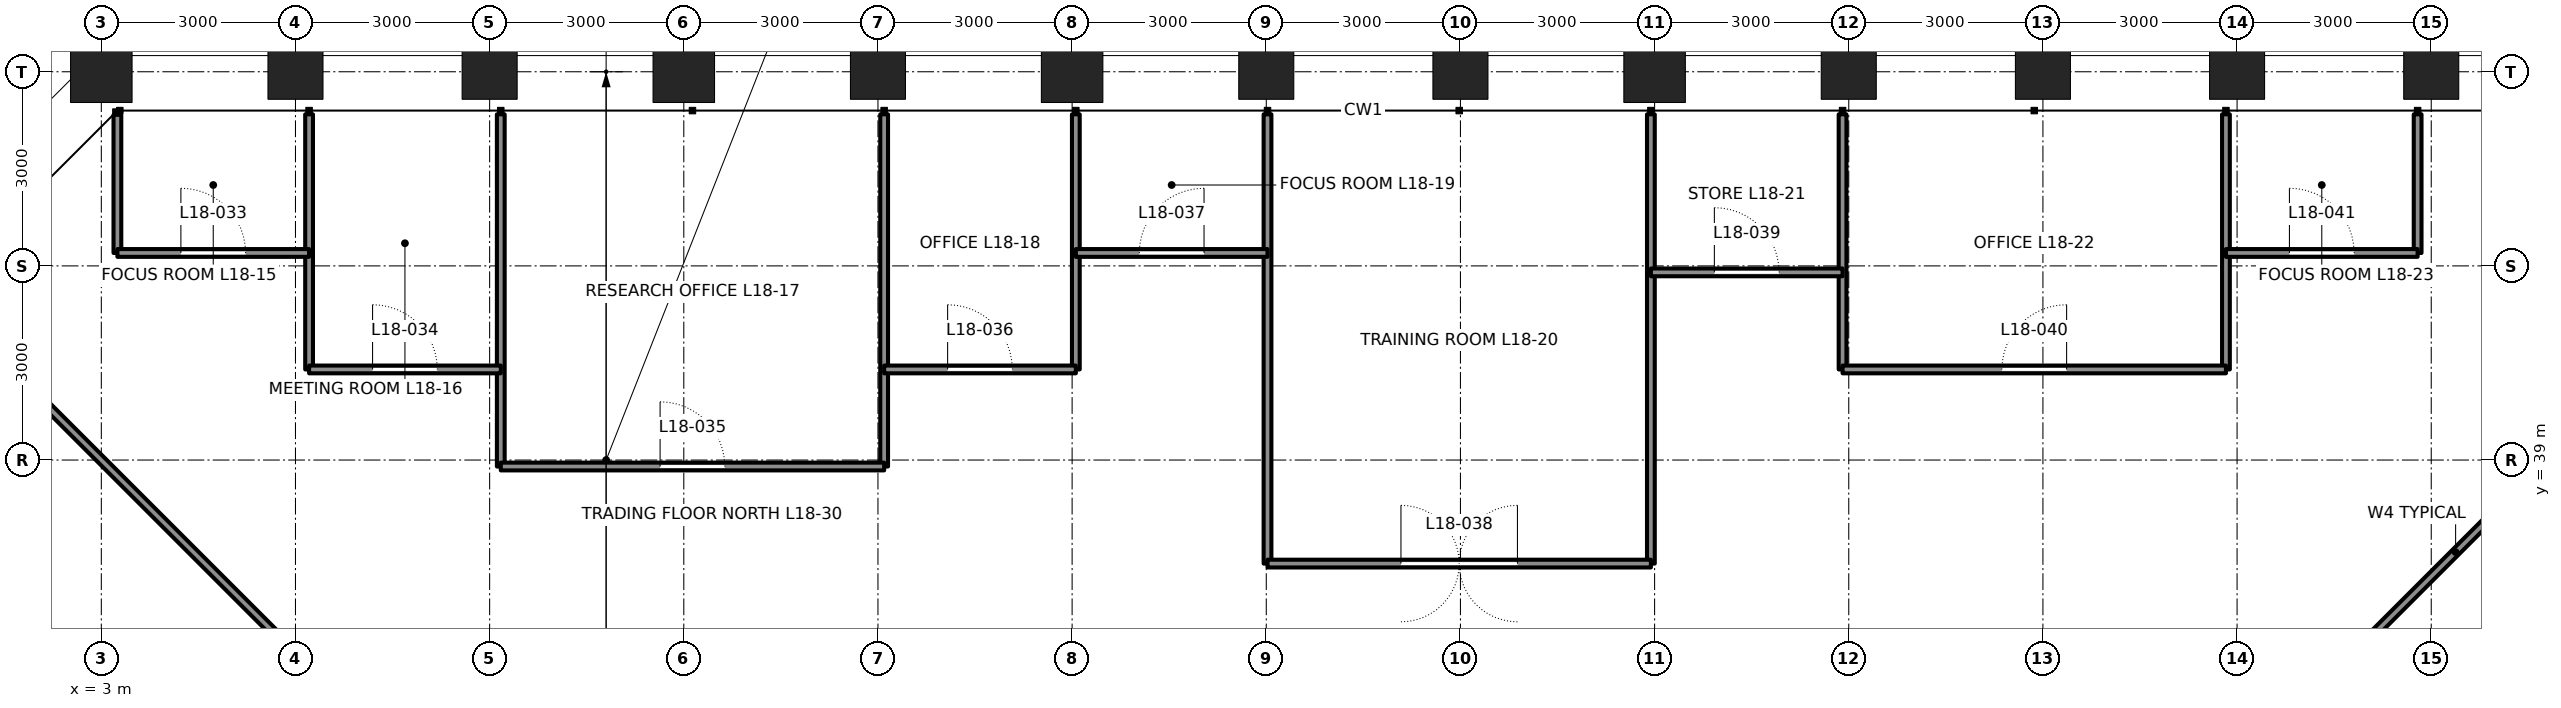
"""IFC4 building model, lengths in metres.
Left out: names, types, materials, properties, quantities, classifications, styles, units other than length and angle.
Written with IfcOpenShell. Run it as: python <this file> out.ifc"""

import sys

from ifc_helpers import new_model, si_unit, direction, frame, frame_2d, origin, origin_2d, place, context, subcontext, project, spatial, rectangle, hollow_rectangle, extrude, element, fill, save


model = new_model("IFC4")
c1 = context("Model", 3, precision=1e-05, world=origin(), true_north=direction((0.0, 1.0)))
c2 = subcontext(c1, "Body", "Model", "MODEL_VIEW")
j1 = project(units=[si_unit("LENGTHUNIT", "METRE"), si_unit("PLANEANGLEUNIT", "RADIAN")], contexts=[c1])
p1 = place(None, origin())
s1 = spatial("IfcSite", under=j1, at=p1, CompositionType="ELEMENT")
p2 = place(p1, origin())
s2 = spatial("IfcBuilding", under=s1, at=p2, CompositionType="ELEMENT")
p3 = place(p2, frame((0.0, 0.0, 87.3)))
s3 = spatial("IfcBuildingStorey", under=s2, at=p3, CompositionType="ELEMENT", Elevation=87.3)
for number, where, z_axis, x_axis in (
    (1, (39.0, 45.0, 0.0), (0.0, 0.0, 1.0), (0.0, 1.0, 0.0)),
    (2, (36.0, 45.0, 0.0), (0.0, 0.0, 1.0), (0.0, 1.0, 0.0)),
    (3, (33.0, 45.0, 0.0), (0.0, 0.0, 1.0), (0.0, 1.0, 0.0)),
    (4, (30.0, 45.0, 0.0), (0.0, 0.0, 1.0), (0.0, 1.0, 0.0)),
):
    element("IfcColumn", number, at=place(p3, frame(where, z_axis=z_axis, x_axis=x_axis)), inside=s3, PredefinedType="COLUMN", context=c2, shape_type="SweptSolid", body=[
        extrude(hollow_rectangle(XDim=0.85, YDim=0.85, WallThickness=0.085, at=origin_2d()), origin(), (0.0, 0.0, 1.0), 4.5),
    ])
p4 = place(p3, frame((27.0, 45.0, 0.0), z_axis=(0.0, 0.0, 1.0), x_axis=(0.0, 1.0, 0.0)))
e5 = element("IfcColumn", 5, at=p4, inside=s3, PredefinedType="COLUMN", context=c2, shape_type="SweptSolid", body=[
    extrude(hollow_rectangle(XDim=0.95, YDim=0.95, WallThickness=0.11, at=origin_2d()), origin(), (0.0, 0.0, 1.0), 4.5),
])
for number, where, z_axis, x_axis in (
    (6, (24.0, 45.0, 0.0), (0.0, 0.0, 1.0), (0.0, 1.0, 0.0)),
    (7, (21.0, 45.0, 0.0), (0.0, 0.0, 1.0), (0.0, 1.0, 0.0)),
):
    element("IfcColumn", number, at=place(p3, frame(where, z_axis=z_axis, x_axis=x_axis)), inside=s3, PredefinedType="COLUMN", context=c2, shape_type="SweptSolid", body=[
        extrude(hollow_rectangle(XDim=0.85, YDim=0.85, WallThickness=0.085, at=origin_2d()), origin(), (0.0, 0.0, 1.0), 4.5),
    ])
p5 = place(p3, frame((18.0, 45.0, 0.0), z_axis=(0.0, 0.0, 1.0), x_axis=(0.0, 1.0, 0.0)))
e8 = element("IfcColumn", 8, at=p5, inside=s3, PredefinedType="COLUMN", context=c2, shape_type="SweptSolid", body=[
    extrude(hollow_rectangle(XDim=0.95, YDim=0.95, WallThickness=0.11, at=origin_2d()), origin(), (0.0, 0.0, 1.0), 4.5),
])
p6 = place(p3, frame((15.0, 45.0, 0.0), z_axis=(0.0, 0.0, 1.0), x_axis=(0.0, 1.0, 0.0)))
e9 = element("IfcColumn", 9, at=p6, inside=s3, PredefinedType="COLUMN", context=c2, shape_type="SweptSolid", body=[
    extrude(hollow_rectangle(XDim=0.85, YDim=0.85, WallThickness=0.085, at=origin_2d()), origin(), (0.0, 0.0, 1.0), 4.5),
])
p7 = place(p3, frame((12.0, 45.0, 0.0), z_axis=(0.0, 0.0, 1.0), x_axis=(0.0, 1.0, 0.0)))
e10 = element("IfcColumn", 10, at=p7, inside=s3, PredefinedType="COLUMN", context=c2, shape_type="SweptSolid", body=[
    extrude(hollow_rectangle(XDim=0.95, YDim=0.95, WallThickness=0.11, at=origin_2d()), origin(), (0.0, 0.0, 1.0), 4.5),
])
for number, where, z_axis, x_axis in (
    (11, (9.0, 45.0, 0.0), (0.0, 0.0, 1.0), (0.0, 1.0, 0.0)),
    (12, (6.0, 45.0, 0.0), (0.0, 0.0, 1.0), (0.0, 1.0, 0.0)),
):
    element("IfcColumn", number, at=place(p3, frame(where, z_axis=z_axis, x_axis=x_axis)), inside=s3, PredefinedType="COLUMN", context=c2, shape_type="SweptSolid", body=[
        extrude(hollow_rectangle(XDim=0.85, YDim=0.85, WallThickness=0.085, at=origin_2d()), origin(), (0.0, 0.0, 1.0), 4.5),
    ])
p8 = place(p3, frame((3.0, 45.0, 0.0), z_axis=(0.0, 0.0, 1.0), x_axis=(0.0, 1.0, 0.0)))
e13 = element("IfcColumn", 13, at=p8, inside=s3, PredefinedType="COLUMN", context=c2, shape_type="SweptSolid", body=[
    extrude(hollow_rectangle(XDim=0.95, YDim=0.95, WallThickness=0.095, at=origin_2d()), origin(), (0.0, 0.0, 1.0), 4.5),
])
p9 = place(p3, frame((3.249, 44.334, -0.3), z_axis=(0.0, 0.0, 1.0), x_axis=(0.0, -1.0, 0.0)))
e14 = element("IfcWall", 14, at=p9, inside=s3, PredefinedType="PARTITIONING", context=c2, shape_type="SweptSolid", body=[
    extrude(rectangle(XDim=2.134, YDim=0.12, at=frame_2d((1.067, 0.0))), origin(), (0.0, 0.0, 1.0), 4.34),
])
p10 = place(p3, frame((6.21, 44.343, -0.3), z_axis=(0.0, 0.0, 1.0), x_axis=(0.0, -1.0, 0.0)))
e15 = element("IfcWall", 15, at=p10, inside=s3, PredefinedType="PARTITIONING", context=c2, shape_type="SweptSolid", body=[
    extrude(rectangle(XDim=3.943, YDim=0.12, at=frame_2d((1.971, 0.0))), origin(), (0.0, 0.0, 1.0), 4.34),
])
p11 = place(p3, frame((9.172, 44.343, -0.3), z_axis=(0.0, 0.0, 1.0), x_axis=(0.0, -1.0, 0.0)))
e16 = element("IfcWall", 16, at=p11, inside=s3, PredefinedType="PARTITIONING", context=c2, shape_type="SweptSolid", body=[
    extrude(rectangle(XDim=5.443, YDim=0.12, at=frame_2d((2.721, 0.0))), origin(), (0.0, 0.0, 1.0), 4.34),
])
p12 = place(p3, frame((15.096, 44.343, -0.3), z_axis=(0.0, 0.0, 1.0), x_axis=(0.0, -1.0, 0.0)))
e17 = element("IfcWall", 17, at=p12, inside=s3, PredefinedType="PARTITIONING", context=c2, shape_type="SweptSolid", body=[
    extrude(rectangle(XDim=5.443, YDim=0.12, at=frame_2d((2.721, 0.0))), origin(), (0.0, 0.0, 1.0), 3.646),
])
p13 = place(p3, frame((18.057, 44.343, -0.3), z_axis=(0.0, 0.0, 1.0), x_axis=(0.0, -1.0, 0.0)))
e18 = element("IfcWall", 18, at=p13, inside=s3, PredefinedType="PARTITIONING", context=c2, shape_type="SweptSolid", body=[
    extrude(rectangle(XDim=3.943, YDim=0.12, at=frame_2d((1.971, 0.0))), origin(), (0.0, 0.0, 1.0), 3.646),
])
for number, where, z_axis, x_axis in (
    (19, (21.019, 44.343, -0.3), (0.0, 0.0, 1.0), (0.0, -1.0, 0.0)),
    (20, (26.943, 44.343, -0.3), (0.0, 0.0, 1.0), (0.0, -1.0, 0.0)),
):
    element("IfcWall", number, at=place(p3, frame(where, z_axis=z_axis, x_axis=x_axis)), inside=s3, PredefinedType="PARTITIONING", context=c2, shape_type="SweptSolid", body=[
        extrude(rectangle(XDim=6.943, YDim=0.12, at=frame_2d((3.471, 0.0))), origin(), (0.0, 0.0, 1.0), 3.646),
    ])
p14 = place(p3, frame((29.904, 44.343, -0.3), z_axis=(0.0, 0.0, 1.0), x_axis=(0.0, -1.0, 0.0)))
e21 = element("IfcWall", 21, at=p14, inside=s3, PredefinedType="PARTITIONING", context=c2, shape_type="SweptSolid", body=[
    extrude(rectangle(XDim=3.943, YDim=0.12, at=frame_2d((1.971, 0.0))), origin(), (0.0, 0.0, 1.0), 3.646),
])
p15 = place(p3, frame((35.828, 44.343, -0.3), z_axis=(0.0, 0.0, 1.0), x_axis=(0.0, -1.0, 0.0)))
e22 = element("IfcWall", 22, at=p15, inside=s3, PredefinedType="PARTITIONING", context=c2, shape_type="SweptSolid", body=[
    extrude(rectangle(XDim=3.943, YDim=0.12, at=frame_2d((1.971, 0.0))), origin(), (0.0, 0.0, 1.0), 4.34),
])
p16 = place(p3, frame((38.79, 44.343, -0.3), z_axis=(0.0, 0.0, 1.0), x_axis=(0.0, -1.0, 0.0)))
e23 = element("IfcWall", 23, at=p16, inside=s3, PredefinedType="PARTITIONING", context=c2, shape_type="SweptSolid", body=[
    extrude(rectangle(XDim=2.143, YDim=0.12, at=frame_2d((1.071, 0.0))), origin(), (0.0, 0.0, 1.0), 4.34),
])
p17 = place(p3, frame((3.249, 42.2, -0.3), z_axis=(0.0, 0.0, 1.0), x_axis=(1.0, 0.0, 0.0)))
e24 = element("IfcWall", 24, at=p17, inside=s3, PredefinedType="PARTITIONING", context=c2, shape_type="SweptSolid", body=[
    extrude(rectangle(XDim=2.962, YDim=0.12, at=frame_2d((1.481, 0.0))), origin(), (0.0, 0.0, 1.0), 4.34),
])
p18 = place(p17, frame((0.981, 0.0, 0.3)))
e25 = element("IfcOpeningElement", 25, at=p18, cuts=e24, PredefinedType="OPENING", context=c2, shape_type="SweptSolid", body=[
    extrude(rectangle(XDim=1.0, YDim=2.4, at=frame_2d((0.5, 1.2))), frame((0.0, 0.07, 0.0), z_axis=(0.0, -1.0, 0.0), x_axis=(1.0, 0.0, 0.0)), (0.0, 0.0, 1.0), 0.14),
])
p19 = place(p3, frame((6.21, 40.4, -0.3), z_axis=(0.0, 0.0, 1.0), x_axis=(1.0, 0.0, 0.0)))
e26 = element("IfcWall", 26, at=p19, inside=s3, PredefinedType="PARTITIONING", context=c2, shape_type="SweptSolid", body=[
    extrude(rectangle(XDim=2.962, YDim=0.12, at=frame_2d((1.481, 0.0))), origin(), (0.0, 0.0, 1.0), 4.34),
])
p20 = place(p19, frame((0.981, 0.0, 0.3)))
e27 = element("IfcOpeningElement", 27, at=p20, cuts=e26, PredefinedType="OPENING", context=c2, shape_type="SweptSolid", body=[
    extrude(rectangle(XDim=1.0, YDim=2.4, at=frame_2d((0.5, 1.2))), frame((0.0, 0.07, 0.0), z_axis=(0.0, -1.0, 0.0), x_axis=(1.0, 0.0, 0.0)), (0.0, 0.0, 1.0), 0.14),
])
p21 = place(p3, frame((9.172, 38.9, -0.3), z_axis=(0.0, 0.0, 1.0), x_axis=(1.0, 0.0, 0.0)))
e28 = element("IfcWall", 28, at=p21, inside=s3, PredefinedType="PARTITIONING", context=c2, shape_type="SweptSolid", body=[
    extrude(rectangle(XDim=5.924, YDim=0.12, at=frame_2d((2.962, 0.0))), origin(), (0.0, 0.0, 1.0), 3.723),
])
p22 = place(p21, frame((2.462, 0.0, 0.3)))
e29 = element("IfcOpeningElement", 29, at=p22, cuts=e28, PredefinedType="OPENING", context=c2, shape_type="SweptSolid", body=[
    extrude(rectangle(XDim=1.0, YDim=2.4, at=frame_2d((0.5, 1.2))), frame((0.0, 0.07, 0.0), z_axis=(0.0, -1.0, 0.0), x_axis=(1.0, 0.0, 0.0)), (0.0, 0.0, 1.0), 0.14),
])
p23 = place(p3, frame((15.096, 40.4, -0.3), z_axis=(0.0, 0.0, 1.0), x_axis=(1.0, 0.0, 0.0)))
e30 = element("IfcWall", 30, at=p23, inside=s3, PredefinedType="PARTITIONING", context=c2, shape_type="SweptSolid", body=[
    extrude(rectangle(XDim=2.962, YDim=0.12, at=frame_2d((1.481, 0.0))), origin(), (0.0, 0.0, 1.0), 4.34),
])
p24 = place(p23, frame((0.981, 0.0, 0.3)))
e31 = element("IfcOpeningElement", 31, at=p24, cuts=e30, PredefinedType="OPENING", context=c2, shape_type="SweptSolid", body=[
    extrude(rectangle(XDim=1.0, YDim=2.4, at=frame_2d((0.5, 1.2))), frame((0.0, 0.07, 0.0), z_axis=(0.0, -1.0, 0.0), x_axis=(1.0, 0.0, 0.0)), (0.0, 0.0, 1.0), 0.14),
])
p25 = place(p3, frame((18.057, 42.2, -0.3), z_axis=(0.0, 0.0, 1.0), x_axis=(1.0, 0.0, 0.0)))
e32 = element("IfcWall", 32, at=p25, inside=s3, PredefinedType="PARTITIONING", context=c2, shape_type="SweptSolid", body=[
    extrude(rectangle(XDim=2.962, YDim=0.12, at=frame_2d((1.481, 0.0))), origin(), (0.0, 0.0, 1.0), 4.34),
])
p26 = place(p25, frame((0.981, 0.0, 0.3)))
e33 = element("IfcOpeningElement", 33, at=p26, cuts=e32, PredefinedType="OPENING", context=c2, shape_type="SweptSolid", body=[
    extrude(rectangle(XDim=1.0, YDim=2.4, at=frame_2d((0.5, 1.2))), frame((0.0, 0.07, 0.0), z_axis=(0.0, -1.0, 0.0), x_axis=(1.0, 0.0, 0.0)), (0.0, 0.0, 1.0), 0.14),
])
p27 = place(p3, frame((21.019, 37.4, -0.3), z_axis=(0.0, 0.0, 1.0), x_axis=(1.0, 0.0, 0.0)))
e34 = element("IfcWall", 34, at=p27, inside=s3, PredefinedType="PARTITIONING", context=c2, shape_type="SweptSolid", body=[
    extrude(rectangle(XDim=5.924, YDim=0.12, at=frame_2d((2.962, 0.0))), origin(), (0.0, 0.0, 1.0), 4.34),
])
p28 = place(p27, frame((2.062, 0.0, 0.3)))
e35 = element("IfcOpeningElement", 35, at=p28, cuts=e34, PredefinedType="OPENING", context=c2, shape_type="SweptSolid", body=[
    extrude(rectangle(XDim=1.8, YDim=2.4, at=frame_2d((0.9, 1.2))), frame((0.0, 0.07, 0.0), z_axis=(0.0, -1.0, 0.0), x_axis=(1.0, 0.0, 0.0)), (0.0, 0.0, 1.0), 0.14),
])
p29 = place(p3, frame((26.943, 41.9, -0.3), z_axis=(0.0, 0.0, 1.0), x_axis=(1.0, 0.0, 0.0)))
e36 = element("IfcWall", 36, at=p29, inside=s3, PredefinedType="PARTITIONING", context=c2, shape_type="SweptSolid", body=[
    extrude(rectangle(XDim=2.962, YDim=0.12, at=frame_2d((1.481, 0.0))), origin(), (0.0, 0.0, 1.0), 4.34),
])
p30 = place(p29, frame((0.981, 0.0, 0.3)))
e37 = element("IfcOpeningElement", 37, at=p30, cuts=e36, PredefinedType="OPENING", context=c2, shape_type="SweptSolid", body=[
    extrude(rectangle(XDim=1.0, YDim=2.4, at=frame_2d((0.5, 1.2))), frame((0.0, 0.07, 0.0), z_axis=(0.0, -1.0, 0.0), x_axis=(1.0, 0.0, 0.0)), (0.0, 0.0, 1.0), 0.14),
])
p31 = place(p3, frame((29.904, 40.4, -0.3), z_axis=(0.0, 0.0, 1.0), x_axis=(1.0, 0.0, 0.0)))
e38 = element("IfcWall", 38, at=p31, inside=s3, PredefinedType="PARTITIONING", context=c2, shape_type="SweptSolid", body=[
    extrude(rectangle(XDim=5.924, YDim=0.12, at=frame_2d((2.962, 0.0))), origin(), (0.0, 0.0, 1.0), 4.34),
])
p32 = place(p31, frame((2.462, 0.0, 0.3)))
e39 = element("IfcOpeningElement", 39, at=p32, cuts=e38, PredefinedType="OPENING", context=c2, shape_type="SweptSolid", body=[
    extrude(rectangle(XDim=1.0, YDim=2.4, at=frame_2d((0.5, 1.2))), frame((0.0, 0.07, 0.0), z_axis=(0.0, -1.0, 0.0), x_axis=(1.0, 0.0, 0.0)), (0.0, 0.0, 1.0), 0.14),
])
p33 = place(p3, frame((35.828, 42.2, -0.3), z_axis=(0.0, 0.0, 1.0), x_axis=(1.0, 0.0, 0.0)))
e40 = element("IfcWall", 40, at=p33, inside=s3, PredefinedType="PARTITIONING", context=c2, shape_type="SweptSolid", body=[
    extrude(rectangle(XDim=2.962, YDim=0.12, at=frame_2d((1.481, 0.0))), origin(), (0.0, 0.0, 1.0), 4.34),
])
p34 = place(p33, frame((0.981, 0.0, 0.3)))
e41 = element("IfcOpeningElement", 41, at=p34, cuts=e40, PredefinedType="OPENING", context=c2, shape_type="SweptSolid", body=[
    extrude(rectangle(XDim=1.0, YDim=2.4, at=frame_2d((0.5, 1.2))), frame((0.0, 0.07, 0.0), z_axis=(0.0, -1.0, 0.0), x_axis=(1.0, 0.0, 0.0)), (0.0, 0.0, 1.0), 0.14),
])
p35 = place(p3, frame((34.8, 33.0, -0.3), z_axis=(0.0, 0.0, 1.0), x_axis=(0.707106781187, 0.707106781187, 0.0)))
e42 = element("IfcWall", 42, at=p35, inside=s3, PredefinedType="PARTITIONING", context=c2, shape_type="SweptSolid", body=[
    extrude(rectangle(XDim=12.944, YDim=0.12, at=frame_2d((6.472, 0.0))), origin(), (0.0, 0.0, 1.0), 4.34),
])
p36 = place(p35, frame((1.3, 0.0, 0.3)))
e43 = element("IfcOpeningElement", 43, at=p36, cuts=e42, PredefinedType="OPENING", context=c2, shape_type="SweptSolid", body=[
    extrude(rectangle(XDim=1.0, YDim=2.4, at=frame_2d((0.5, 1.2))), frame((0.0, 0.07, 0.0), z_axis=(0.0, -1.0, 0.0), x_axis=(1.0, 0.0, 0.0)), (0.0, 0.0, 1.0), 0.14),
])
p37 = place(p3, frame((9.0, 33.0, -0.3), z_axis=(0.0, 0.0, 1.0), x_axis=(-0.707106781187, 0.707106781187, 0.0)))
e44 = element("IfcWall", 44, at=p37, inside=s3, PredefinedType="PARTITIONING", context=c2, shape_type="SweptSolid", body=[
    extrude(rectangle(XDim=11.842, YDim=0.12, at=frame_2d((5.921, 0.0))), origin(), (0.0, 0.0, 1.0), 4.34),
])
p38 = place(p37, frame((1.3, 0.0, 0.3)))
e45 = element("IfcOpeningElement", 45, at=p38, cuts=e44, PredefinedType="OPENING", context=c2, shape_type="SweptSolid", body=[
    extrude(rectangle(XDim=1.0, YDim=2.4, at=frame_2d((0.5, 1.2))), frame((0.0, 0.07, 0.0), z_axis=(0.0, -1.0, 0.0), x_axis=(1.0, 0.0, 0.0)), (0.0, 0.0, 1.0), 0.14),
])
p39 = place(p18, origin())
e46 = element("IfcDoor", 46, at=p39, inside=s3, OperationType="SINGLE_SWING_LEFT", PredefinedType="DOOR", context=c2, shape_type="SweptSolid", body=[
    extrude(rectangle(XDim=1.0, YDim=2.4, at=frame_2d((0.5, 1.2))), frame((0.0, 0.025, 0.0), z_axis=(0.0, -1.0, 0.0), x_axis=(1.0, 0.0, 0.0)), (0.0, 0.0, 1.0), 0.05),
])
fill(e25, e46)
p40 = place(p20, origin())
e47 = element("IfcDoor", 47, at=p40, inside=s3, OperationType="SINGLE_SWING_LEFT", PredefinedType="DOOR", context=c2, shape_type="SweptSolid", body=[
    extrude(rectangle(XDim=1.0, YDim=2.4, at=frame_2d((0.5, 1.2))), frame((0.0, 0.025, 0.0), z_axis=(0.0, -1.0, 0.0), x_axis=(1.0, 0.0, 0.0)), (0.0, 0.0, 1.0), 0.05),
])
fill(e27, e47)
p41 = place(p22, origin())
e48 = element("IfcDoor", 48, at=p41, inside=s3, OperationType="SINGLE_SWING_LEFT", PredefinedType="DOOR", context=c2, shape_type="SweptSolid", body=[
    extrude(rectangle(XDim=1.0, YDim=2.4, at=frame_2d((0.5, 1.2))), frame((0.0, 0.025, 0.0), z_axis=(0.0, -1.0, 0.0), x_axis=(1.0, 0.0, 0.0)), (0.0, 0.0, 1.0), 0.05),
])
fill(e29, e48)
p42 = place(p24, origin())
e49 = element("IfcDoor", 49, at=p42, inside=s3, OperationType="SINGLE_SWING_LEFT", PredefinedType="DOOR", context=c2, shape_type="SweptSolid", body=[
    extrude(rectangle(XDim=1.0, YDim=2.4, at=frame_2d((0.5, 1.2))), frame((0.0, 0.025, 0.0), z_axis=(0.0, -1.0, 0.0), x_axis=(1.0, 0.0, 0.0)), (0.0, 0.0, 1.0), 0.05),
])
fill(e31, e49)
p43 = place(p26, origin())
e50 = element("IfcDoor", 50, at=p43, inside=s3, OperationType="SINGLE_SWING_RIGHT", PredefinedType="DOOR", context=c2, shape_type="SweptSolid", body=[
    extrude(rectangle(XDim=1.0, YDim=2.4, at=frame_2d((0.5, 1.2))), frame((0.0, 0.025, 0.0), z_axis=(0.0, -1.0, 0.0), x_axis=(1.0, 0.0, 0.0)), (0.0, 0.0, 1.0), 0.05),
])
fill(e33, e50)
p44 = place(p28, origin())
e51 = element("IfcDoor", 51, at=p44, inside=s3, OperationType="DOUBLE_DOOR_DOUBLE_SWING", PredefinedType="DOOR", context=c2, shape_type="SweptSolid", body=[
    extrude(rectangle(XDim=1.8, YDim=2.4, at=frame_2d((0.9, 1.2))), frame((0.0, 0.025, 0.0), z_axis=(0.0, -1.0, 0.0), x_axis=(1.0, 0.0, 0.0)), (0.0, 0.0, 1.0), 0.05),
])
fill(e35, e51)
p45 = place(p30, origin())
e52 = element("IfcDoor", 52, at=p45, inside=s3, OperationType="SINGLE_SWING_LEFT", PredefinedType="DOOR", context=c2, shape_type="SweptSolid", body=[
    extrude(rectangle(XDim=1.0, YDim=2.4, at=frame_2d((0.5, 1.2))), frame((0.0, 0.025, 0.0), z_axis=(0.0, -1.0, 0.0), x_axis=(1.0, 0.0, 0.0)), (0.0, 0.0, 1.0), 0.05),
])
fill(e37, e52)
p46 = place(p32, origin())
e53 = element("IfcDoor", 53, at=p46, inside=s3, OperationType="SINGLE_SWING_RIGHT", PredefinedType="DOOR", context=c2, shape_type="SweptSolid", body=[
    extrude(rectangle(XDim=1.0, YDim=2.4, at=frame_2d((0.5, 1.2))), frame((0.0, 0.025, 0.0), z_axis=(0.0, -1.0, 0.0), x_axis=(1.0, 0.0, 0.0)), (0.0, 0.0, 1.0), 0.05),
])
fill(e39, e53)
p47 = place(p34, origin())
e54 = element("IfcDoor", 54, at=p47, inside=s3, OperationType="SINGLE_SWING_LEFT", PredefinedType="DOOR", context=c2, shape_type="SweptSolid", body=[
    extrude(rectangle(XDim=1.0, YDim=2.4, at=frame_2d((0.5, 1.2))), frame((0.0, 0.025, 0.0), z_axis=(0.0, -1.0, 0.0), x_axis=(1.0, 0.0, 0.0)), (0.0, 0.0, 1.0), 0.05),
])
fill(e41, e54)
save(model, sys.argv[1])
